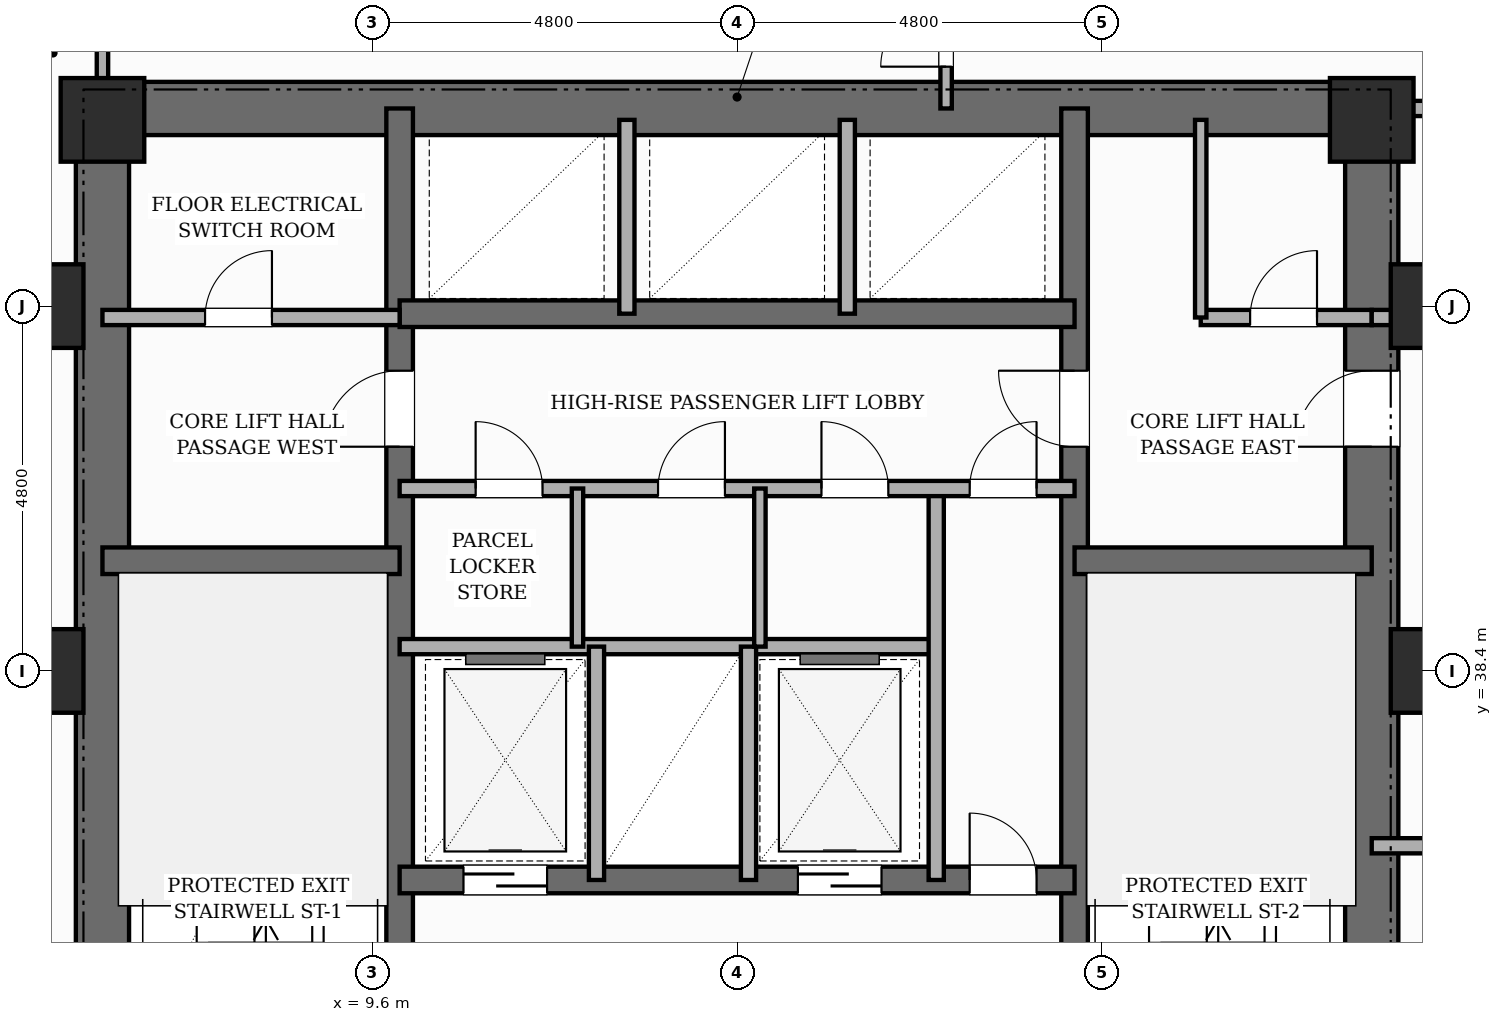
"""IFC4 building model, lengths in metres.
Left out: names, types, materials, properties, quantities, classifications, styles, units other than length and angle.
Written with IfcOpenShell. Run it as: python <this file> out.ifc"""

import sys

from ifc_helpers import new_model, si_unit, direction, frame, frame_2d, origin, origin_2d, place, context, subcontext, project, spatial, rectangle, extrude, element, fill, save


model = new_model("IFC4")
c1 = context("Model", 3, precision=1e-05, world=origin(), true_north=direction((0.0, 1.0)))
c2 = subcontext(c1, "Body", "Model", "MODEL_VIEW")
j1 = project(units=[si_unit("LENGTHUNIT", "METRE"), si_unit("PLANEANGLEUNIT", "RADIAN")], contexts=[c1])
p1 = place(None, origin())
s1 = spatial("IfcSite", under=j1, at=p1, CompositionType="ELEMENT")
p2 = place(p1, origin())
s2 = spatial("IfcBuilding", under=s1, at=p2, CompositionType="ELEMENT")
p3 = place(p2, frame((0.0, 0.0, 25.0)))
s3 = spatial("IfcBuildingStorey", under=s2, at=p3, CompositionType="ELEMENT", Elevation=25.0)
p4 = place(p3, frame((6.05, 30.55, 0.0), z_axis=(0.0, 0.0, 1.0), x_axis=(0.0, 1.0, 0.0)))
e1 = element("IfcWall", 1, at=p4, inside=s3, PredefinedType="SHEAR", context=c2, shape_type="SweptSolid", body=[
    extrude(rectangle(XDim=15.6, YDim=0.7, at=frame_2d((7.8, 0.0))), origin(), (0.0, 0.0, 1.0), 3.6),
])
p5 = place(p3, frame((22.75, 30.55, 0.0), z_axis=(0.0, 0.0, 1.0), x_axis=(0.0, 1.0, 0.0)))
e2 = element("IfcWall", 2, at=p5, inside=s3, PredefinedType="SHEAR", context=c2, shape_type="SweptSolid", body=[
    extrude(rectangle(XDim=15.6, YDim=0.7, at=frame_2d((7.8, 0.0))), origin(), (0.0, 0.0, 1.0), 3.6),
])
p6 = place(p5, frame((10.8, 0.0, 0.0)))
e3 = element("IfcOpeningElement", 3, at=p6, cuts=e2, PredefinedType="OPENING", context=c2, shape_type="SweptSolid", body=[
    extrude(rectangle(XDim=1.0, YDim=2.15, at=frame_2d((0.5, 1.075))), frame((0.0, 0.36, 0.0), z_axis=(0.0, -1.0, 0.0), x_axis=(1.0, 0.0, 0.0)), (0.0, 0.0, 1.0), 0.72),
])
p7 = place(p3, frame((6.05, 45.8, 0.0), z_axis=(0.0, 0.0, 1.0), x_axis=(1.0, 0.0, 0.0)))
e4 = element("IfcWall", 4, at=p7, inside=s3, PredefinedType="SHEAR", context=c2, shape_type="SweptSolid", body=[
    extrude(rectangle(XDim=16.7, YDim=0.7, at=frame_2d((8.35, 0.0))), origin(), (0.0, 0.0, 1.0), 3.6),
])
p8 = place(p3, frame((9.96, 30.9, 0.0), z_axis=(0.0, 0.0, 1.0), x_axis=(0.0, 1.0, 0.0)))
e5 = element("IfcWall", 5, at=p8, inside=s3, PredefinedType="SHEAR", context=c2, shape_type="SweptSolid", body=[
    extrude(rectangle(XDim=14.9, YDim=0.35, at=frame_2d((7.45, 0.0))), origin(), (0.0, 0.0, 1.0), 3.6),
])
p9 = place(p8, frame((0.65, 0.0, 0.0)))
e6 = element("IfcOpeningElement", 6, at=p9, cuts=e5, PredefinedType="OPENING", context=c2, shape_type="SweptSolid", body=[
    extrude(rectangle(XDim=0.95, YDim=2.1, at=frame_2d((0.475, 1.05))), frame((0.0, 0.185, 0.0), z_axis=(0.0, -1.0, 0.0), x_axis=(1.0, 0.0, 0.0)), (0.0, 0.0, 1.0), 0.37),
])
p10 = place(p8, frame((10.45, 0.0, 0.0)))
e7 = element("IfcOpeningElement", 7, at=p10, cuts=e5, PredefinedType="OPENING", context=c2, shape_type="SweptSolid", body=[
    extrude(rectangle(XDim=1.0, YDim=2.15, at=frame_2d((0.5, 1.075))), frame((0.0, 0.185, 0.0), z_axis=(0.0, -1.0, 0.0), x_axis=(1.0, 0.0, 0.0)), (0.0, 0.0, 1.0), 0.37),
])
p11 = place(p3, frame((18.84, 30.9, 0.0), z_axis=(0.0, 0.0, 1.0), x_axis=(0.0, 1.0, 0.0)))
e8 = element("IfcWall", 8, at=p11, inside=s3, PredefinedType="SHEAR", context=c2, shape_type="SweptSolid", body=[
    extrude(rectangle(XDim=14.9, YDim=0.35, at=frame_2d((7.45, 0.0))), origin(), (0.0, 0.0, 1.0), 3.6),
])
p12 = place(p11, frame((0.65, 0.0, 0.0)))
e9 = element("IfcOpeningElement", 9, at=p12, cuts=e8, PredefinedType="OPENING", context=c2, shape_type="SweptSolid", body=[
    extrude(rectangle(XDim=0.95, YDim=2.1, at=frame_2d((0.475, 1.05))), frame((0.0, 0.185, 0.0), z_axis=(0.0, -1.0, 0.0), x_axis=(1.0, 0.0, 0.0)), (0.0, 0.0, 1.0), 0.37),
])
p13 = place(p11, frame((10.45, 0.0, 0.0)))
e10 = element("IfcOpeningElement", 10, at=p13, cuts=e8, PredefinedType="OPENING", context=c2, shape_type="SweptSolid", body=[
    extrude(rectangle(XDim=1.0, YDim=2.15, at=frame_2d((0.5, 1.075))), frame((0.0, 0.185, 0.0), z_axis=(0.0, -1.0, 0.0), x_axis=(1.0, 0.0, 0.0)), (0.0, 0.0, 1.0), 0.37),
])
for number, where, z_axis, x_axis in (
    (11, (6.05, 39.85, 0.0), (0.0, 0.0, 1.0), (1.0, 0.0, 0.0)),
    (12, (18.84, 39.85, 0.0), (0.0, 0.0, 1.0), (1.0, 0.0, 0.0)),
):
    element("IfcWall", number, at=place(p3, frame(where, z_axis=z_axis, x_axis=x_axis)), inside=s3, PredefinedType="SHEAR", context=c2, shape_type="SweptSolid", body=[
        extrude(rectangle(XDim=3.91, YDim=0.35, at=frame_2d((1.955, 0.0))), origin(), (0.0, 0.0, 1.0), 3.6),
    ])
p14 = place(p3, frame((9.96, 35.65, 0.0), z_axis=(0.0, 0.0, 1.0), x_axis=(1.0, 0.0, 0.0)))
e13 = element("IfcWall", 13, at=p14, inside=s3, PredefinedType="SHEAR", context=c2, shape_type="SweptSolid", body=[
    extrude(rectangle(XDim=8.88, YDim=0.35, at=frame_2d((4.44, 0.0))), origin(), (0.0, 0.0, 1.0), 3.6),
])
p15 = place(p14, frame((0.84, 0.0, 0.0)))
e14 = element("IfcOpeningElement", 14, at=p15, cuts=e13, PredefinedType="OPENING", context=c2, shape_type="SweptSolid", body=[
    extrude(rectangle(XDim=1.1, YDim=2.15, at=frame_2d((0.55, 1.075))), frame((0.0, 0.185, 0.0), z_axis=(0.0, -1.0, 0.0), x_axis=(1.0, 0.0, 0.0)), (0.0, 0.0, 1.0), 0.37),
])
p16 = place(p14, frame((5.24, 0.0, 0.0)))
e15 = element("IfcOpeningElement", 15, at=p16, cuts=e13, PredefinedType="OPENING", context=c2, shape_type="SweptSolid", body=[
    extrude(rectangle(XDim=1.1, YDim=2.15, at=frame_2d((0.55, 1.075))), frame((0.0, 0.185, 0.0), z_axis=(0.0, -1.0, 0.0), x_axis=(1.0, 0.0, 0.0)), (0.0, 0.0, 1.0), 0.37),
])
p17 = place(p14, frame((7.5, 0.0, 0.0)))
e16 = element("IfcOpeningElement", 16, at=p17, cuts=e13, PredefinedType="OPENING", context=c2, shape_type="SweptSolid", body=[
    extrude(rectangle(XDim=0.88, YDim=2.1, at=frame_2d((0.44, 1.05))), frame((0.0, 0.185, 0.0), z_axis=(0.0, -1.0, 0.0), x_axis=(1.0, 0.0, 0.0)), (0.0, 0.0, 1.0), 0.37),
])
p18 = place(p3, frame((9.96, 43.1, 0.0), z_axis=(0.0, 0.0, 1.0), x_axis=(1.0, 0.0, 0.0)))
e17 = element("IfcWall", 17, at=p18, inside=s3, PredefinedType="SHEAR", context=c2, shape_type="SweptSolid", body=[
    extrude(rectangle(XDim=8.88, YDim=0.35, at=frame_2d((4.44, 0.0))), origin(), (0.0, 0.0, 1.0), 3.6),
])
for number, where, z_axis, x_axis in (
    (18, (5.25, 38.4, 0.0), (0.0, 0.0, 1.0), (1.0, 0.0, 0.0)),
    (19, (5.25, 43.2, 0.0), (0.0, 0.0, 1.0), (1.0, 0.0, 0.0)),
    (20, (6.05, 45.65, 0.0), (0.0, 0.0, 1.0), (1.0, 0.0, 0.0)),
    (21, (22.75, 45.65, 0.0), (0.0, 0.0, 1.0), (1.0, 0.0, 0.0)),
    (22, (23.55, 38.4, 0.0), (0.0, 0.0, 1.0), (1.0, 0.0, 0.0)),
    (23, (23.55, 43.2, 0.0), (0.0, 0.0, 1.0), (1.0, 0.0, 0.0)),
):
    element("IfcColumn", number, at=place(p3, frame(where, z_axis=z_axis, x_axis=x_axis)), inside=s3, PredefinedType="COLUMN", context=c2, shape_type="SweptSolid", body=[
        extrude(rectangle(XDim=1.1, YDim=1.1, at=origin_2d()), origin(), (0.0, 0.0, 1.0), 3.6),
    ])
p19 = place(p3, frame((5.03, 46.16, 0.0), z_axis=(0.0, 0.0, 1.0), x_axis=(0.382650053678, 0.92389335771, 0.0)))
e24 = element("IfcWall", 24, at=p19, inside=s3, PredefinedType="STANDARD", context=c2, shape_type="SweptSolid", body=[
    extrude(rectangle(XDim=0.626, YDim=0.32, at=frame_2d((0.313, 0.0))), origin(), (0.0, 0.0, 1.0), 3.35),
])
p20 = place(p3, frame((9.96, 38.72, 0.0), z_axis=(0.0, 0.0, 1.0), x_axis=(1.0, 0.0, 0.0)))
e25 = element("IfcWall", 25, at=p20, inside=s3, PredefinedType="POLYGONAL", context=c2, shape_type="SweptSolid", body=[
    extrude(rectangle(XDim=7.06, YDim=0.2, at=frame_2d((3.53, 0.0))), origin(), (0.0, 0.0, 1.0), 3.35),
])
for number, where, z_axis, x_axis in (
    (26, (12.55, 35.65, 0.0), (0.0, 0.0, 1.0), (0.0, 1.0, 0.0)),
    (27, (14.55, 35.65, 0.0), (0.0, 0.0, 1.0), (0.0, 1.0, 0.0)),
):
    element("IfcWall", number, at=place(p3, frame(where, z_axis=z_axis, x_axis=x_axis)), inside=s3, PredefinedType="POLYGONAL", context=c2, shape_type="SweptSolid", body=[
        extrude(rectangle(XDim=3.07, YDim=0.2, at=frame_2d((1.535, 0.0))), origin(), (0.0, 0.0, 1.0), 3.35),
    ])
p21 = place(p3, frame((17.02, 35.65, 0.0), z_axis=(0.0, 0.0, 1.0), x_axis=(0.0, 1.0, 0.0)))
e28 = element("IfcWall", 28, at=p21, inside=s3, PredefinedType="POLYGONAL", context=c2, shape_type="SweptSolid", body=[
    extrude(rectangle(XDim=5.15, YDim=0.2, at=frame_2d((2.575, 0.0))), origin(), (0.0, 0.0, 1.0), 3.35),
])
p22 = place(p3, frame((9.96, 40.8, 0.0), z_axis=(0.0, 0.0, 1.0), x_axis=(1.0, 0.0, 0.0)))
e29 = element("IfcWall", 29, at=p22, inside=s3, PredefinedType="POLYGONAL", context=c2, shape_type="SweptSolid", body=[
    extrude(rectangle(XDim=8.88, YDim=0.2, at=frame_2d((4.44, 0.0))), origin(), (0.0, 0.0, 1.0), 3.35),
])
p23 = place(p22, frame((7.5, 0.0, 0.0)))
e30 = element("IfcOpeningElement", 30, at=p23, cuts=e29, PredefinedType="OPENING", context=c2, shape_type="SweptSolid", body=[
    extrude(rectangle(XDim=0.88, YDim=2.1, at=frame_2d((0.44, 1.05))), frame((0.0, 0.11, 0.0), z_axis=(0.0, -1.0, 0.0), x_axis=(1.0, 0.0, 0.0)), (0.0, 0.0, 1.0), 0.22),
])
p24 = place(p22, frame((1.0, 0.0, 0.0)))
e31 = element("IfcOpeningElement", 31, at=p24, cuts=e29, PredefinedType="OPENING", context=c2, shape_type="SweptSolid", body=[
    extrude(rectangle(XDim=0.88, YDim=2.1, at=frame_2d((0.44, 1.05))), frame((0.0, 0.11, 0.0), z_axis=(0.0, -1.0, 0.0), x_axis=(1.0, 0.0, 0.0)), (0.0, 0.0, 1.0), 0.22),
])
p25 = place(p22, frame((3.4, 0.0, 0.0)))
e32 = element("IfcOpeningElement", 32, at=p25, cuts=e29, PredefinedType="OPENING", context=c2, shape_type="SweptSolid", body=[
    extrude(rectangle(XDim=0.88, YDim=2.1, at=frame_2d((0.44, 1.05))), frame((0.0, 0.11, 0.0), z_axis=(0.0, -1.0, 0.0), x_axis=(1.0, 0.0, 0.0)), (0.0, 0.0, 1.0), 0.22),
])
p26 = place(p22, frame((5.55, 0.0, 0.0)))
e33 = element("IfcOpeningElement", 33, at=p26, cuts=e29, PredefinedType="OPENING", context=c2, shape_type="SweptSolid", body=[
    extrude(rectangle(XDim=0.88, YDim=2.1, at=frame_2d((0.44, 1.05))), frame((0.0, 0.11, 0.0), z_axis=(0.0, -1.0, 0.0), x_axis=(1.0, 0.0, 0.0)), (0.0, 0.0, 1.0), 0.22),
])
p27 = place(p3, frame((20.5, 43.05, 0.0), z_axis=(0.0, 0.0, 1.0), x_axis=(1.0, 0.0, 0.0)))
e34 = element("IfcWall", 34, at=p27, inside=s3, PredefinedType="POLYGONAL", context=c2, shape_type="SweptSolid", body=[
    extrude(rectangle(XDim=2.25, YDim=0.2, at=frame_2d((1.125, 0.0))), origin(), (0.0, 0.0, 1.0), 2.53),
])
p28 = place(p27, frame((0.65, 0.0, 0.0)))
e35 = element("IfcOpeningElement", 35, at=p28, cuts=e34, PredefinedType="OPENING", context=c2, shape_type="SweptSolid", body=[
    extrude(rectangle(XDim=0.88, YDim=2.1, at=frame_2d((0.44, 1.05))), frame((0.0, 0.11, 0.0), z_axis=(0.0, -1.0, 0.0), x_axis=(1.0, 0.0, 0.0)), (0.0, 0.0, 1.0), 0.22),
])
p29 = place(p3, frame((6.05, 43.05, 0.0), z_axis=(0.0, 0.0, 1.0), x_axis=(1.0, 0.0, 0.0)))
e36 = element("IfcWall", 36, at=p29, inside=s3, PredefinedType="POLYGONAL", context=c2, shape_type="SweptSolid", body=[
    extrude(rectangle(XDim=3.91, YDim=0.2, at=frame_2d((1.955, 0.0))), origin(), (0.0, 0.0, 1.0), 2.53),
])
p30 = place(p29, frame((1.35, 0.0, 0.0)))
e37 = element("IfcOpeningElement", 37, at=p30, cuts=e36, PredefinedType="OPENING", context=c2, shape_type="SweptSolid", body=[
    extrude(rectangle(XDim=0.88, YDim=2.1, at=frame_2d((0.44, 1.05))), frame((0.0, 0.11, 0.0), z_axis=(0.0, -1.0, 0.0), x_axis=(1.0, 0.0, 0.0)), (0.0, 0.0, 1.0), 0.22),
])
for number, where, z_axis, x_axis in (
    (38, (12.95, 43.1, 0.0), (0.0, 0.0, 1.0), (0.0, 1.0, 0.0)),
    (39, (15.85, 43.1, 0.0), (0.0, 0.0, 1.0), (0.0, 1.0, 0.0)),
):
    element("IfcWall", number, at=place(p3, frame(where, z_axis=z_axis, x_axis=x_axis)), inside=s3, PredefinedType="POLYGONAL", context=c2, shape_type="SweptSolid", body=[
        extrude(rectangle(XDim=2.55, YDim=0.2, at=frame_2d((1.275, 0.0))), origin(), (0.0, 0.0, 1.0), 3.35),
    ])
for number, where, z_axis, x_axis in (
    (40, (12.3, 38.72, 0.0), (0.0, 0.0, 1.0), (0.0, 1.0, 0.0)),
    (41, (14.7, 38.72, 0.0), (0.0, 0.0, 1.0), (0.0, 1.0, 0.0)),
):
    element("IfcWall", number, at=place(p3, frame(where, z_axis=z_axis, x_axis=x_axis)), inside=s3, PredefinedType="PARTITIONING", context=c2, shape_type="SweptSolid", body=[
        extrude(rectangle(XDim=2.08, YDim=0.15, at=frame_2d((1.04, 0.0))), origin(), (0.0, 0.0, 1.0), 3.35),
    ])
p31 = place(p3, frame((20.5, 43.05, 0.0), z_axis=(0.0, 0.0, 1.0), x_axis=(0.0, 1.0, 0.0)))
e42 = element("IfcWall", 42, at=p31, inside=s3, PredefinedType="PARTITIONING", context=c2, shape_type="SweptSolid", body=[
    extrude(rectangle(XDim=2.6, YDim=0.15, at=frame_2d((1.3, 0.0))), origin(), (0.0, 0.0, 1.0), 3.35),
])
p32 = place(p3, frame((22.75, 45.8, 0.0), z_axis=(0.0, 0.0, 1.0), x_axis=(1.0, 0.0, 0.0)))
e43 = element("IfcWall", 43, at=p32, inside=s3, PredefinedType="PARTITIONING", context=c2, shape_type="SweptSolid", body=[
    extrude(rectangle(XDim=2.75, YDim=0.2, at=frame_2d((1.375, 0.0))), origin(), (0.0, 0.0, 1.0), 3.35),
])
p33 = place(p3, frame((6.05, 45.8, 0.0), z_axis=(0.0, 0.0, 1.0), x_axis=(0.0, 1.0, 0.0)))
e44 = element("IfcWall", 44, at=p33, inside=s3, PredefinedType="PARTITIONING", context=c2, shape_type="SweptSolid", body=[
    extrude(rectangle(XDim=1.46, YDim=0.15, at=frame_2d((0.73, 0.0))), origin(), (0.0, 0.0, 1.0), 3.35),
])
p34 = place(p3, frame((17.15, 45.8, 0.0), z_axis=(0.0, 0.0, 1.0), x_axis=(0.0, 1.0, 0.0)))
e45 = element("IfcWall", 45, at=p34, inside=s3, PredefinedType="PARTITIONING", context=c2, shape_type="SweptSolid", body=[
    extrude(rectangle(XDim=1.88, YDim=0.15, at=frame_2d((0.94, 0.0))), origin(), (0.0, 0.0, 1.0), 3.35),
])
p35 = place(p34, frame((0.55, 0.0, 0.0)))
e46 = element("IfcOpeningElement", 46, at=p35, cuts=e45, PredefinedType="OPENING", context=c2, shape_type="SweptSolid", body=[
    extrude(rectangle(XDim=0.86, YDim=2.1, at=frame_2d((0.43, 1.05))), frame((0.0, 0.085, 0.0), z_axis=(0.0, -1.0, 0.0), x_axis=(1.0, 0.0, 0.0)), (0.0, 0.0, 1.0), 0.17),
])
p36 = place(p3, frame((22.75, 36.1, 0.0), z_axis=(0.0, 0.0, 1.0), x_axis=(1.0, 0.0, 0.0)))
e47 = element("IfcWall", 47, at=p36, inside=s3, PredefinedType="PARTITIONING", context=c2, shape_type="SweptSolid", body=[
    extrude(rectangle(XDim=21.27, YDim=0.2, at=frame_2d((10.635, 0.0))), origin(), (0.0, 0.0, 1.0), 3.35),
])
p37 = place(p36, frame((1.628, 0.0, 0.0)))
e48 = element("IfcOpeningElement", 48, at=p37, cuts=e47, PredefinedType="OPENING", context=c2, shape_type="SweptSolid", body=[
    extrude(rectangle(XDim=0.98, YDim=2.18, at=frame_2d((0.49, 1.09))), frame((0.0, 0.11, 0.0), z_axis=(0.0, -1.0, 0.0), x_axis=(1.0, 0.0, 0.0)), (0.0, 0.0, 1.0), 0.22),
])
p38 = place(p36, frame((14.725, 0.0, 0.0)))
e49 = element("IfcOpeningElement", 49, at=p38, cuts=e47, PredefinedType="OPENING", context=c2, shape_type="SweptSolid", body=[
    extrude(rectangle(XDim=0.98, YDim=2.18, at=frame_2d((0.49, 1.09))), frame((0.0, 0.11, 0.0), z_axis=(0.0, -1.0, 0.0), x_axis=(1.0, 0.0, 0.0)), (0.0, 0.0, 1.0), 0.22),
])
p39 = place(p3, frame((22.75, 43.05, 0.0), z_axis=(0.0, 0.0, 1.0), x_axis=(1.0, 0.0, 0.0)))
e50 = element("IfcWall", 50, at=p39, inside=s3, PredefinedType="PARTITIONING", context=c2, shape_type="SweptSolid", body=[
    extrude(rectangle(XDim=2.75, YDim=0.2, at=frame_2d((1.375, 0.0))), origin(), (0.0, 0.0, 1.0), 2.53),
])
p40 = place(p15, origin())
e51 = element("IfcDoor", 51, at=p40, inside=s3, OperationType="SLIDING_TO_LEFT", PredefinedType="DOOR", context=c2, shape_type="SweptSolid", body=[
    extrude(rectangle(XDim=1.1, YDim=2.15, at=frame_2d((0.55, 1.075))), frame((0.0, 0.025, 0.0), z_axis=(0.0, -1.0, 0.0), x_axis=(1.0, 0.0, 0.0)), (0.0, 0.0, 1.0), 0.05),
])
fill(e14, e51)
p41 = place(p16, origin())
e52 = element("IfcDoor", 52, at=p41, inside=s3, OperationType="SLIDING_TO_RIGHT", PredefinedType="DOOR", context=c2, shape_type="SweptSolid", body=[
    extrude(rectangle(XDim=1.1, YDim=2.15, at=frame_2d((0.55, 1.075))), frame((0.0, 0.025, 0.0), z_axis=(0.0, -1.0, 0.0), x_axis=(1.0, 0.0, 0.0)), (0.0, 0.0, 1.0), 0.05),
])
fill(e15, e52)
p42 = place(p17, origin())
e53 = element("IfcDoor", 53, at=p42, inside=s3, OperationType="SINGLE_SWING_LEFT", PredefinedType="DOOR", context=c2, shape_type="SweptSolid", body=[
    extrude(rectangle(XDim=0.88, YDim=2.1, at=frame_2d((0.44, 1.05))), frame((0.0, 0.025, 0.0), z_axis=(0.0, -1.0, 0.0), x_axis=(1.0, 0.0, 0.0)), (0.0, 0.0, 1.0), 0.05),
])
fill(e16, e53)
p43 = place(p23, origin())
e54 = element("IfcDoor", 54, at=p43, inside=s3, OperationType="SINGLE_SWING_RIGHT", PredefinedType="DOOR", context=c2, shape_type="SweptSolid", body=[
    extrude(rectangle(XDim=0.88, YDim=2.1, at=frame_2d((0.44, 1.05))), frame((0.0, 0.025, 0.0), z_axis=(0.0, -1.0, 0.0), x_axis=(1.0, 0.0, 0.0)), (0.0, 0.0, 1.0), 0.05),
])
fill(e30, e54)
p44 = place(p10, origin())
e55 = element("IfcDoor", 55, at=p44, inside=s3, OperationType="SINGLE_SWING_LEFT", PredefinedType="DOOR", context=c2, shape_type="SweptSolid", body=[
    extrude(rectangle(XDim=1.0, YDim=2.15, at=frame_2d((0.5, 1.075))), frame((0.0, 0.025, 0.0), z_axis=(0.0, -1.0, 0.0), x_axis=(1.0, 0.0, 0.0)), (0.0, 0.0, 1.0), 0.05),
])
fill(e7, e55)
p45 = place(p13, origin())
e56 = element("IfcDoor", 56, at=p45, inside=s3, OperationType="SINGLE_SWING_RIGHT", PredefinedType="DOOR", context=c2, shape_type="SweptSolid", body=[
    extrude(rectangle(XDim=1.0, YDim=2.15, at=frame_2d((0.5, 1.075))), frame((0.0, 0.025, 0.0), z_axis=(0.0, -1.0, 0.0), x_axis=(1.0, 0.0, 0.0)), (0.0, 0.0, 1.0), 0.05),
])
fill(e10, e56)
p46 = place(p6, origin())
e57 = element("IfcDoor", 57, at=p46, inside=s3, OperationType="SINGLE_SWING_LEFT", PredefinedType="DOOR", context=c2, shape_type="SweptSolid", body=[
    extrude(rectangle(XDim=1.0, YDim=2.15, at=frame_2d((0.5, 1.075))), frame((0.0, 0.025, 0.0), z_axis=(0.0, -1.0, 0.0), x_axis=(1.0, 0.0, 0.0)), (0.0, 0.0, 1.0), 0.05),
])
fill(e3, e57)
p47 = place(p30, origin())
e58 = element("IfcDoor", 58, at=p47, inside=s3, OperationType="SINGLE_SWING_RIGHT", PredefinedType="DOOR", context=c2, shape_type="SweptSolid", body=[
    extrude(rectangle(XDim=0.88, YDim=2.1, at=frame_2d((0.44, 1.05))), frame((0.0, 0.025, 0.0), z_axis=(0.0, -1.0, 0.0), x_axis=(1.0, 0.0, 0.0)), (0.0, 0.0, 1.0), 0.05),
])
fill(e37, e58)
p48 = place(p24, origin())
e59 = element("IfcDoor", 59, at=p48, inside=s3, OperationType="SINGLE_SWING_LEFT", PredefinedType="DOOR", context=c2, shape_type="SweptSolid", body=[
    extrude(rectangle(XDim=0.88, YDim=2.1, at=frame_2d((0.44, 1.05))), frame((0.0, 0.025, 0.0), z_axis=(0.0, -1.0, 0.0), x_axis=(1.0, 0.0, 0.0)), (0.0, 0.0, 1.0), 0.05),
])
fill(e31, e59)
p49 = place(p25, origin())
e60 = element("IfcDoor", 60, at=p49, inside=s3, OperationType="SINGLE_SWING_RIGHT", PredefinedType="DOOR", context=c2, shape_type="SweptSolid", body=[
    extrude(rectangle(XDim=0.88, YDim=2.1, at=frame_2d((0.44, 1.05))), frame((0.0, 0.025, 0.0), z_axis=(0.0, -1.0, 0.0), x_axis=(1.0, 0.0, 0.0)), (0.0, 0.0, 1.0), 0.05),
])
fill(e32, e60)
p50 = place(p26, origin())
e61 = element("IfcDoor", 61, at=p50, inside=s3, OperationType="SINGLE_SWING_LEFT", PredefinedType="DOOR", context=c2, shape_type="SweptSolid", body=[
    extrude(rectangle(XDim=0.88, YDim=2.1, at=frame_2d((0.44, 1.05))), frame((0.0, 0.025, 0.0), z_axis=(0.0, -1.0, 0.0), x_axis=(1.0, 0.0, 0.0)), (0.0, 0.0, 1.0), 0.05),
])
fill(e33, e61)
p51 = place(p28, origin())
e62 = element("IfcDoor", 62, at=p51, inside=s3, OperationType="SINGLE_SWING_RIGHT", PredefinedType="DOOR", context=c2, shape_type="SweptSolid", body=[
    extrude(rectangle(XDim=0.88, YDim=2.1, at=frame_2d((0.44, 1.05))), frame((0.0, 0.025, 0.0), z_axis=(0.0, -1.0, 0.0), x_axis=(1.0, 0.0, 0.0)), (0.0, 0.0, 1.0), 0.05),
])
fill(e35, e62)
p52 = place(p35, origin())
e63 = element("IfcDoor", 63, at=p52, inside=s3, OperationType="SINGLE_SWING_LEFT", PredefinedType="DOOR", context=c2, shape_type="SweptSolid", body=[
    extrude(rectangle(XDim=0.86, YDim=2.1, at=frame_2d((0.43, 1.05))), frame((0.0, 0.025, 0.0), z_axis=(0.0, -1.0, 0.0), x_axis=(1.0, 0.0, 0.0)), (0.0, 0.0, 1.0), 0.05),
])
fill(e46, e63)
save(model, sys.argv[1])
